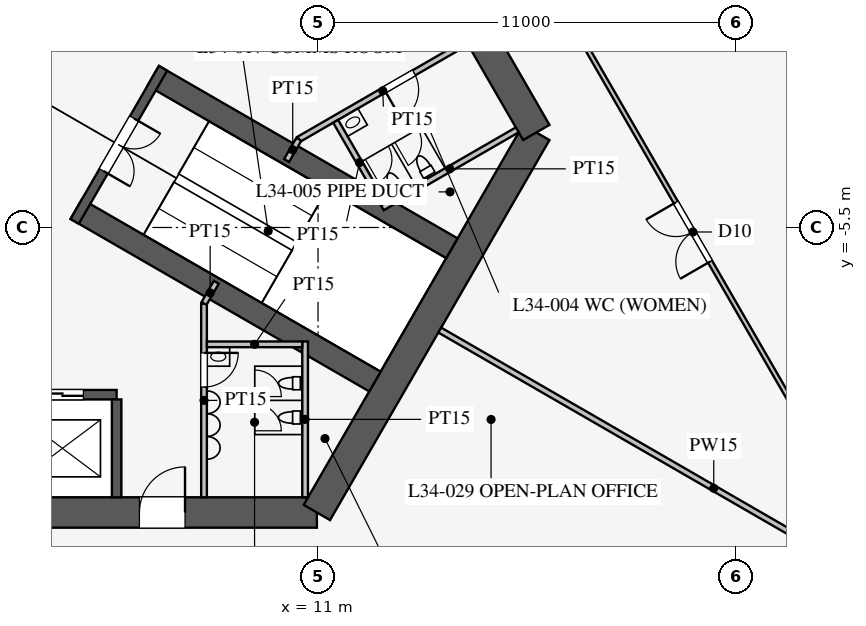
"""IFC4 building model, lengths in metres.
Left out: names, types, materials, properties, quantities, classifications, styles, units other than length and angle.
Written with IfcOpenShell. Run it as: python <this file> out.ifc"""

import sys

from ifc_helpers import new_model, si_unit, direction, frame, frame_2d, origin, place, context, subcontext, project, spatial, rectangle, extrude, element, fill, save


model = new_model("IFC4")
c1 = context("Model", 3, precision=1e-05, world=origin(), true_north=direction((0.0, 1.0)))
c2 = subcontext(c1, "Body", "Model", "MODEL_VIEW")
j1 = project(units=[si_unit("LENGTHUNIT", "METRE"), si_unit("PLANEANGLEUNIT", "RADIAN")], contexts=[c1])
p1 = place(None, origin())
s1 = spatial("IfcSite", under=j1, at=p1, CompositionType="ELEMENT")
p2 = place(p1, origin())
s2 = spatial("IfcBuilding", under=s1, at=p2, CompositionType="ELEMENT")
p3 = place(p2, frame((0.0, 0.0, 149.3)))
s3 = spatial("IfcBuildingStorey", under=s2, at=p3, CompositionType="ELEMENT", Elevation=149.3)
p4 = place(p3, frame((-10.97, -13.0, 0.0), z_axis=(0.0, 0.0, 1.0), x_axis=(1.0, 0.0, 0.0)))
e1 = element("IfcWall", 1, at=p4, inside=s3, PredefinedType="SHEAR", context=c2, shape_type="SweptSolid", body=[
    extrude(rectangle(XDim=21.939, YDim=0.8, at=frame_2d((10.97, 0.0))), origin(), (0.0, 0.0, 1.0), 4.2),
])
p5 = place(p4, frame((17.27, 0.0, 0.0)))
e2 = element("IfcOpeningElement", 2, at=p5, cuts=e1, PredefinedType="OPENING", context=c2, shape_type="SweptSolid", body=[
    extrude(rectangle(XDim=1.2, YDim=2.1, at=frame_2d((0.6, 1.05))), frame((0.0, 0.41, 0.0), z_axis=(0.0, -1.0, 0.0), x_axis=(1.0, 0.0, 0.0)), (0.0, 0.0, 1.0), 0.82),
])
p6 = place(p4, frame((3.47, 0.0, 0.0)))
e3 = element("IfcOpeningElement", 3, at=p6, cuts=e1, PredefinedType="OPENING", context=c2, shape_type="SweptSolid", body=[
    extrude(rectangle(XDim=1.2, YDim=2.1, at=frame_2d((0.6, 1.05))), frame((0.0, 0.41, 0.0), z_axis=(0.0, -1.0, 0.0), x_axis=(1.0, 0.0, 0.0)), (0.0, 0.0, 1.0), 0.82),
])
p7 = place(p3, frame((10.97, -13.0, 0.0), z_axis=(0.0, 0.0, 1.0), x_axis=(0.499995765644, 0.866027848477, 0.0)))
e4 = element("IfcWall", 4, at=p7, inside=s3, PredefinedType="SHEAR", context=c2, shape_type="SweptSolid", body=[
    extrude(rectangle(XDim=11.547, YDim=0.8, at=frame_2d((5.773, 0.0))), origin(), (0.0, 0.0, 1.0), 4.2),
])
p8 = place(p3, frame((16.743, -3.0, 0.0), z_axis=(0.0, 0.0, 1.0), x_axis=(-0.500002442456, 0.866023993627, 0.0)))
e5 = element("IfcWall", 5, at=p8, inside=s3, PredefinedType="SHEAR", context=c2, shape_type="SweptSolid", body=[
    extrude(rectangle(XDim=21.939, YDim=0.8, at=frame_2d((10.97, 0.0))), origin(), (0.0, 0.0, 1.0), 4.2),
])
p9 = place(p8, frame((17.27, 0.0, 0.0)))
e6 = element("IfcOpeningElement", 6, at=p9, cuts=e5, PredefinedType="OPENING", context=c2, shape_type="SweptSolid", body=[
    extrude(rectangle(XDim=1.2, YDim=2.1, at=frame_2d((0.6, 1.05))), frame((0.0, 0.41, 0.0), z_axis=(0.0, -1.0, 0.0), x_axis=(1.0, 0.0, 0.0)), (0.0, 0.0, 1.0), 0.82),
])
p10 = place(p8, frame((3.47, 0.0, 0.0)))
e7 = element("IfcOpeningElement", 7, at=p10, cuts=e5, PredefinedType="OPENING", context=c2, shape_type="SweptSolid", body=[
    extrude(rectangle(XDim=1.2, YDim=2.1, at=frame_2d((0.6, 1.05))), frame((0.0, 0.41, 0.0), z_axis=(0.0, -1.0, 0.0), x_axis=(1.0, 0.0, 0.0)), (0.0, 0.0, 1.0), 0.82),
])
p11 = place(p3, frame((-5.7, -9.9, 0.0), z_axis=(0.0, 0.0, 1.0), x_axis=(1.0, 0.0, 0.0)))
e8 = element("IfcWall", 8, at=p11, inside=s3, PredefinedType="SHEAR", context=c2, shape_type="SweptSolid", body=[
    extrude(rectangle(XDim=11.4, YDim=0.25, at=frame_2d((5.7, 0.0))), origin(), (0.0, 0.0, 1.0), 4.2),
])
p12 = place(p11, frame((0.875, 0.0, 0.0)))
e9 = element("IfcOpeningElement", 9, at=p12, cuts=e8, PredefinedType="OPENING", context=c2, shape_type="SweptSolid", body=[
    extrude(rectangle(XDim=1.1, YDim=2.2, at=frame_2d((0.55, 1.1))), frame((0.0, 0.135, 0.0), z_axis=(0.0, -1.0, 0.0), x_axis=(1.0, 0.0, 0.0)), (0.0, 0.0, 1.0), 0.27),
])
p13 = place(p11, frame((3.725, 0.0, 0.0)))
e10 = element("IfcOpeningElement", 10, at=p13, cuts=e8, PredefinedType="OPENING", context=c2, shape_type="SweptSolid", body=[
    extrude(rectangle(XDim=1.1, YDim=2.2, at=frame_2d((0.55, 1.1))), frame((0.0, 0.135, 0.0), z_axis=(0.0, -1.0, 0.0), x_axis=(1.0, 0.0, 0.0)), (0.0, 0.0, 1.0), 0.27),
])
p14 = place(p11, frame((6.575, 0.0, 0.0)))
e11 = element("IfcOpeningElement", 11, at=p14, cuts=e8, PredefinedType="OPENING", context=c2, shape_type="SweptSolid", body=[
    extrude(rectangle(XDim=1.1, YDim=2.2, at=frame_2d((0.55, 1.1))), frame((0.0, 0.135, 0.0), z_axis=(0.0, -1.0, 0.0), x_axis=(1.0, 0.0, 0.0)), (0.0, 0.0, 1.0), 0.27),
])
p15 = place(p11, frame((9.425, 0.0, 0.0)))
e12 = element("IfcOpeningElement", 12, at=p15, cuts=e8, PredefinedType="OPENING", context=c2, shape_type="SweptSolid", body=[
    extrude(rectangle(XDim=1.1, YDim=2.2, at=frame_2d((0.55, 1.1))), frame((0.0, 0.135, 0.0), z_axis=(0.0, -1.0, 0.0), x_axis=(1.0, 0.0, 0.0)), (0.0, 0.0, 1.0), 0.27),
])
p16 = place(p3, frame((5.7, -10.025, 0.0), z_axis=(0.0, 0.0, 1.0), x_axis=(0.0, -1.0, 0.0)))
e13 = element("IfcWall", 13, at=p16, inside=s3, PredefinedType="SHEAR", context=c2, shape_type="SweptSolid", body=[
    extrude(rectangle(XDim=2.575, YDim=0.25, at=frame_2d((1.288, 0.0))), origin(), (0.0, 0.0, 1.0), 4.2),
])
for number, where, z_axis, x_axis in (
    (14, (4.638, -5.016, 0.0), (0.0, 0.0, 1.0), (0.866, -0.5, 0.0)),
    (15, (6.663, -1.509, 0.0), (0.0, 0.0, 1.0), (0.866, -0.5, 0.0)),
):
    element("IfcWall", number, at=place(p3, frame(where, z_axis=z_axis, x_axis=x_axis)), inside=s3, PredefinedType="SHEAR", context=c2, shape_type="SweptSolid", body=[
        extrude(rectangle(XDim=9.075, YDim=0.6, at=frame_2d((4.538, 0.0))), origin(), (0.0, 0.0, 1.0), 4.2),
    ])
p17 = place(p3, frame((4.597, -5.339, 0.0), z_axis=(0.0, 0.0, 1.0), x_axis=(0.499984536904, 0.866034331223, 0.0)))
e16 = element("IfcWall", 16, at=p17, inside=s3, PredefinedType="SHEAR", context=c2, shape_type="SweptSolid", body=[
    extrude(rectangle(XDim=4.65, YDim=0.25, at=frame_2d((2.325, 0.0))), origin(), (0.0, 0.0, 1.0), 4.2),
])
p18 = place(p17, frame((1.525, 0.0, 0.0)))
e17 = element("IfcOpeningElement", 17, at=p18, cuts=e16, PredefinedType="OPENING", context=c2, shape_type="SweptSolid", body=[
    extrude(rectangle(XDim=1.6, YDim=2.1, at=frame_2d((0.8, 1.05))), frame((0.0, 0.135, 0.0), z_axis=(0.0, -1.0, 0.0), x_axis=(1.0, 0.0, 0.0)), (0.0, 0.0, 1.0), 0.27),
])
p19 = place(p3, frame((8.0, -7.5, 0.0), z_axis=(0.0, 0.0, 1.0), x_axis=(0.0, -1.0, 0.0)))
e18 = element("IfcWall", 18, at=p19, inside=s3, PredefinedType="PARTITIONING", context=c2, shape_type="SweptSolid", body=[
    extrude(rectangle(XDim=5.1, YDim=0.15, at=frame_2d((2.55, 0.0))), origin(), (0.0, 0.0, 1.0), 4.0),
])
p20 = place(p19, frame((1.3, 0.0, 0.0)))
e19 = element("IfcOpeningElement", 19, at=p20, cuts=e18, PredefinedType="OPENING", context=c2, shape_type="SweptSolid", body=[
    extrude(rectangle(XDim=0.9, YDim=2.1, at=frame_2d((0.45, 1.05))), frame((0.0, 0.085, 0.0), z_axis=(0.0, -1.0, 0.0), x_axis=(1.0, 0.0, 0.0)), (0.0, 0.0, 1.0), 0.17),
])
p21 = place(p3, frame((10.495, -3.178, 0.0), z_axis=(0.0, 0.0, 1.0), x_axis=(0.86602216432, 0.500005610874, 0.0)))
e20 = element("IfcWall", 20, at=p21, inside=s3, PredefinedType="PARTITIONING", context=c2, shape_type="SweptSolid", body=[
    extrude(rectangle(XDim=5.1, YDim=0.15, at=frame_2d((2.55, 0.0))), origin(), (0.0, 0.0, 1.0), 4.0),
])
p22 = place(p21, frame((2.6, 0.0, 0.0)))
e21 = element("IfcOpeningElement", 21, at=p22, cuts=e20, PredefinedType="OPENING", context=c2, shape_type="SweptSolid", body=[
    extrude(rectangle(XDim=0.9, YDim=2.1, at=frame_2d((0.45, 1.05))), frame((0.0, 0.085, 0.0), z_axis=(0.0, -1.0, 0.0), x_axis=(1.0, 0.0, 0.0)), (0.0, 0.0, 1.0), 0.17),
])
for number, where, z_axis, x_axis in (
    (22, (8.0, -7.5, 0.0), (0.0, 0.0, 1.0), (0.5, 0.866, 0.0)),
    (23, (10.495, -3.178, 0.0), (0.0, 0.0, 1.0), (-0.5, -0.866, 0.0)),
):
    element("IfcWall", number, at=place(p3, frame(where, z_axis=z_axis, x_axis=x_axis)), inside=s3, PredefinedType="PARTITIONING", context=c2, shape_type="SweptSolid", body=[
        extrude(rectangle(XDim=0.645, YDim=0.15, at=frame_2d((0.323, 0.0))), origin(), (0.0, 0.0, 1.0), 4.0),
    ])
p23 = place(p3, frame((10.66, -8.5, 0.0), z_axis=(0.0, 0.0, 1.0), x_axis=(0.0, -1.0, 0.0)))
e24 = element("IfcWall", 24, at=p23, inside=s3, PredefinedType="PARTITIONING", context=c2, shape_type="SweptSolid", body=[
    extrude(rectangle(XDim=4.1, YDim=0.15, at=frame_2d((2.05, 0.0))), origin(), (0.0, 0.0, 1.0), 4.0),
])
p24 = place(p3, frame((8.075, -8.575, 0.0), z_axis=(0.0, 0.0, 1.0), x_axis=(1.0, 0.0, 0.0)))
e25 = element("IfcWall", 25, at=p24, inside=s3, PredefinedType="PARTITIONING", context=c2, shape_type="SweptSolid", body=[
    extrude(rectangle(XDim=2.51, YDim=0.15, at=frame_2d((1.255, 0.0))), origin(), (0.0, 0.0, 1.0), 4.0),
])
p25 = place(p3, frame((12.691, -4.982, 0.0), z_axis=(0.0, 0.0, 1.0), x_axis=(0.8660249478, 0.500000789788, 0.0)))
e26 = element("IfcWall", 26, at=p25, inside=s3, PredefinedType="PARTITIONING", context=c2, shape_type="SweptSolid", body=[
    extrude(rectangle(XDim=4.1, YDim=0.15, at=frame_2d((2.05, 0.0))), origin(), (0.0, 0.0, 1.0), 4.0),
])
p26 = place(p3, frame((11.464, -2.706, 0.0), z_axis=(0.0, 0.0, 1.0), x_axis=(0.50001992892, -0.866013897511, 0.0)))
e27 = element("IfcWall", 27, at=p26, inside=s3, PredefinedType="PARTITIONING", context=c2, shape_type="SweptSolid", body=[
    extrude(rectangle(XDim=2.51, YDim=0.15, at=frame_2d((1.255, 0.0))), origin(), (0.0, 0.0, 1.0), 4.0),
])
p27 = place(p3, frame((14.203, -8.2, 0.0), z_axis=(0.0, 0.0, 1.0), x_axis=(0.866024668836, -0.500001272966, 0.0)))
e28 = element("IfcWall", 28, at=p27, inside=s3, PredefinedType="PARTITIONING", context=c2, shape_type="SweptSolid", body=[
    extrude(rectangle(XDim=16.65, YDim=0.15, at=frame_2d((8.325, 0.0))), origin(), (0.0, 0.0, 1.0), 2.3),
])
p28 = place(p3, frame((26.415, -15.231, 0.0), z_axis=(0.0, 0.0, 1.0), x_axis=(-0.50000091641, 0.866024874695, 0.0)))
e29 = element("IfcWall", 29, at=p28, inside=s3, PredefinedType="PARTITIONING", context=c2, shape_type="SweptSolid", body=[
    extrude(rectangle(XDim=52.796, YDim=0.12, at=frame_2d((26.398, 0.0))), origin(), (0.0, 0.0, 1.0), 2.9),
])
p29 = place(p28, frame((10.2, 0.0, 0.15)))
e30 = element("IfcOpeningElement", 30, at=p29, cuts=e29, PredefinedType="OPENING", context=c2, shape_type="SweptSolid", body=[
    extrude(rectangle(XDim=1.8, YDim=2.1, at=frame_2d((0.9, 1.05))), frame((0.0, 0.07, 0.0), z_axis=(0.0, -1.0, 0.0), x_axis=(1.0, 0.0, 0.0)), (0.0, 0.0, 1.0), 0.14),
])
p30 = place(p28, frame((40.8, 0.0, 0.15)))
e31 = element("IfcOpeningElement", 31, at=p30, cuts=e29, PredefinedType="OPENING", context=c2, shape_type="SweptSolid", body=[
    extrude(rectangle(XDim=1.8, YDim=2.1, at=frame_2d((0.9, 1.05))), frame((0.0, 0.07, 0.0), z_axis=(0.0, -1.0, 0.0), x_axis=(1.0, 0.0, 0.0)), (0.0, 0.0, 1.0), 0.14),
])
p31 = place(p3, frame((24.043, -1.708, 0.0), z_axis=(0.0, 0.0, 1.0), x_axis=(-0.41992827805, 0.90755729367, 0.0)))
e32 = element("IfcWall", 32, at=p31, inside=s3, PredefinedType="PARTITIONING", context=c2, shape_type="SweptSolid", body=[
    extrude(rectangle(XDim=4.519, YDim=0.12, at=frame_2d((2.259, 0.0))), origin(), (0.0, 0.0, 1.0), 2.9),
])
p32 = place(p31, frame((1.75, 0.0, 0.15)))
e33 = element("IfcOpeningElement", 33, at=p32, cuts=e32, PredefinedType="OPENING", context=c2, shape_type="SweptSolid", body=[
    extrude(rectangle(XDim=1.0, YDim=2.1, at=frame_2d((0.5, 1.05))), frame((0.0, 0.07, 0.0), z_axis=(0.0, -1.0, 0.0), x_axis=(1.0, 0.0, 0.0)), (0.0, 0.0, 1.0), 0.14),
])
p33 = place(p20, origin())
e34 = element("IfcDoor", 34, at=p33, inside=s3, OperationType="SINGLE_SWING_LEFT", PredefinedType="DOOR", context=c2, shape_type="SweptSolid", body=[
    extrude(rectangle(XDim=0.9, YDim=2.1, at=frame_2d((0.45, 1.05))), frame((0.0, 0.025, 0.0), z_axis=(0.0, -1.0, 0.0), x_axis=(1.0, 0.0, 0.0)), (0.0, 0.0, 1.0), 0.05),
])
fill(e19, e34)
p34 = place(p22, frame((0.9, 0.0, 0.0), z_axis=(0.0, 0.0, 1.0), x_axis=(-1.0, 0.0, 0.0)))
e35 = element("IfcDoor", 35, at=p34, inside=s3, OperationType="SINGLE_SWING_RIGHT", PredefinedType="DOOR", context=c2, shape_type="SweptSolid", body=[
    extrude(rectangle(XDim=0.9, YDim=2.1, at=frame_2d((0.45, 1.05))), frame((0.0, 0.025, 0.0), z_axis=(0.0, -1.0, 0.0), x_axis=(1.0, 0.0, 0.0)), (0.0, 0.0, 1.0), 0.05),
])
fill(e21, e35)
p35 = place(p18, frame((1.6, 0.0, 0.0), z_axis=(0.0, 0.0, 1.0), x_axis=(-1.0, 0.0, 0.0)))
e36 = element("IfcDoor", 36, at=p35, inside=s3, OperationType="DOUBLE_DOOR_SINGLE_SWING", PredefinedType="DOOR", context=c2, shape_type="SweptSolid", body=[
    extrude(rectangle(XDim=1.6, YDim=2.1, at=frame_2d((0.8, 1.05))), frame((0.0, 0.025, 0.0), z_axis=(0.0, -1.0, 0.0), x_axis=(1.0, 0.0, 0.0)), (0.0, 0.0, 1.0), 0.05),
])
fill(e17, e36)
p36 = place(p5, origin())
e37 = element("IfcDoor", 37, at=p36, inside=s3, OperationType="SINGLE_SWING_RIGHT", PredefinedType="DOOR", context=c2, shape_type="SweptSolid", body=[
    extrude(rectangle(XDim=1.2, YDim=2.1, at=frame_2d((0.6, 1.05))), frame((0.0, 0.025, 0.0), z_axis=(0.0, -1.0, 0.0), x_axis=(1.0, 0.0, 0.0)), (0.0, 0.0, 1.0), 0.05),
])
fill(e2, e37)
p37 = place(p29, origin())
e38 = element("IfcDoor", 38, at=p37, inside=s3, OperationType="DOUBLE_DOOR_SINGLE_SWING", PredefinedType="DOOR", context=c2, shape_type="SweptSolid", body=[
    extrude(rectangle(XDim=1.8, YDim=2.1, at=frame_2d((0.9, 1.05))), frame((0.0, 0.025, 0.0), z_axis=(0.0, -1.0, 0.0), x_axis=(1.0, 0.0, 0.0)), (0.0, 0.0, 1.0), 0.05),
])
fill(e30, e38)
p38 = place(p15, origin())
e39 = element("IfcDoor", 39, at=p38, inside=s3, OperationType="DOUBLE_DOOR_SLIDING", PredefinedType="DOOR", context=c2, shape_type="SweptSolid", body=[
    extrude(rectangle(XDim=1.1, YDim=2.2, at=frame_2d((0.55, 1.1))), frame((0.0, 0.025, 0.0), z_axis=(0.0, -1.0, 0.0), x_axis=(1.0, 0.0, 0.0)), (0.0, 0.0, 1.0), 0.05),
])
fill(e12, e39)
save(model, sys.argv[1])
